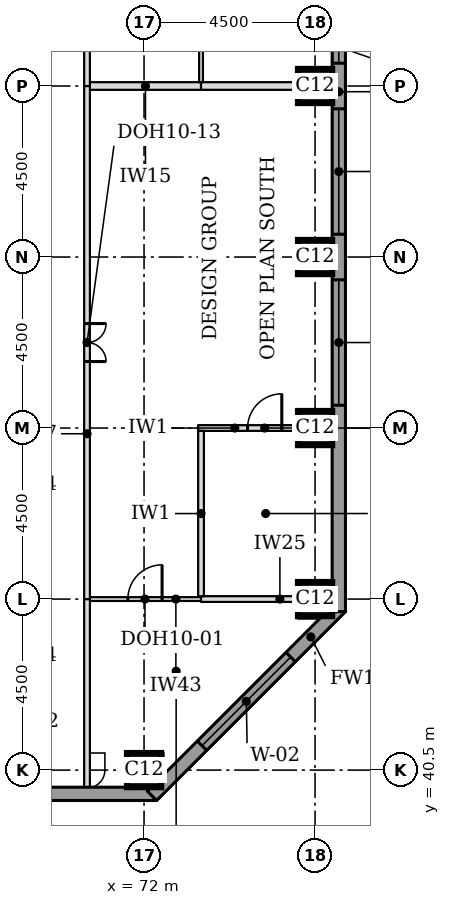
"""IFC4 building model, lengths in metres.
Left out: names, types, materials, properties, quantities, classifications, styles, units other than length and angle.
Written with IfcOpenShell. Run it as: python <this file> out.ifc"""

import sys

from ifc_helpers import new_model, si_unit, direction, frame, frame_2d, origin, origin_2d, place, context, subcontext, project, spatial, rectangle, extrude, element, fill, save


model = new_model("IFC4")
c1 = context("Model", 3, precision=1e-05, world=origin(), true_north=direction((0.0, 1.0)))
c2 = subcontext(c1, "Body", "Model", "MODEL_VIEW")
j1 = project(units=[si_unit("LENGTHUNIT", "METRE"), si_unit("PLANEANGLEUNIT", "RADIAN")], contexts=[c1])
p1 = place(None, origin())
s1 = spatial("IfcSite", under=j1, at=p1, CompositionType="ELEMENT")
p2 = place(p1, origin())
s2 = spatial("IfcBuilding", under=s1, at=p2, CompositionType="ELEMENT")
p3 = place(p2, frame((0.0, 0.0, 223.0)))
s3 = spatial("IfcBuildingStorey", under=s2, at=p3, CompositionType="ELEMENT", Elevation=223.0)
for number, where, z_axis, x_axis in (
    (1, (72.0, 40.5, 0.0), (0.0, 0.0, 1.0), (1.0, 0.0, 0.0)),
    (2, (76.5, 45.0, 0.0), (0.0, 0.0, 1.0), (1.0, 0.0, 0.0)),
    (3, (76.5, 49.5, 0.0), (0.0, 0.0, 1.0), (1.0, 0.0, 0.0)),
    (4, (76.5, 54.0, 0.0), (0.0, 0.0, 1.0), (1.0, 0.0, 0.0)),
    (5, (76.5, 58.5, 0.0), (0.0, 0.0, 1.0), (1.0, 0.0, 0.0)),
):
    element("IfcColumn", number, at=place(p3, frame(where, z_axis=z_axis, x_axis=x_axis)), inside=s3, PredefinedType="COLUMN", context=c2, shape_type="SweptSolid", body=[
        extrude(rectangle(XDim=0.9, YDim=0.9, at=origin_2d()), origin(), (0.0, 0.0, 1.0), 3.7),
    ])
p4 = place(p3, frame((36.0, 39.875, 0.0), z_axis=(0.0, 0.0, 1.0), x_axis=(1.0, 0.0, 0.0)))
e6 = element("IfcWall", 6, at=p4, inside=s3, PredefinedType="STANDARD", context=c2, shape_type="SweptSolid", body=[
    extrude(rectangle(XDim=36.331, YDim=0.35, at=frame_2d((18.166, 0.0))), origin(), (0.0, 0.0, 1.0), 3.525),
])
p5 = place(p4, frame((5.1, 0.0, 0.9)))
e7 = element("IfcOpeningElement", 7, at=p5, cuts=e6, PredefinedType="OPENING", context=c2, shape_type="SweptSolid", body=[
    extrude(rectangle(XDim=3.3, YDim=1.9, at=frame_2d((1.65, 0.95))), frame((0.0, 0.185, 0.0), z_axis=(0.0, -1.0, 0.0), x_axis=(1.0, 0.0, 0.0)), (0.0, 0.0, 1.0), 0.37),
])
p6 = place(p4, frame((9.6, 0.0, 0.9)))
e8 = element("IfcOpeningElement", 8, at=p6, cuts=e6, PredefinedType="OPENING", context=c2, shape_type="SweptSolid", body=[
    extrude(rectangle(XDim=3.3, YDim=1.9, at=frame_2d((1.65, 0.95))), frame((0.0, 0.185, 0.0), z_axis=(0.0, -1.0, 0.0), x_axis=(1.0, 0.0, 0.0)), (0.0, 0.0, 1.0), 0.37),
])
p7 = place(p4, frame((14.1, 0.0, 0.9)))
e9 = element("IfcOpeningElement", 9, at=p7, cuts=e6, PredefinedType="OPENING", context=c2, shape_type="SweptSolid", body=[
    extrude(rectangle(XDim=3.3, YDim=1.9, at=frame_2d((1.65, 0.95))), frame((0.0, 0.185, 0.0), z_axis=(0.0, -1.0, 0.0), x_axis=(1.0, 0.0, 0.0)), (0.0, 0.0, 1.0), 0.37),
])
p8 = place(p4, frame((18.6, 0.0, 0.9)))
e10 = element("IfcOpeningElement", 10, at=p8, cuts=e6, PredefinedType="OPENING", context=c2, shape_type="SweptSolid", body=[
    extrude(rectangle(XDim=3.3, YDim=1.9, at=frame_2d((1.65, 0.95))), frame((0.0, 0.185, 0.0), z_axis=(0.0, -1.0, 0.0), x_axis=(1.0, 0.0, 0.0)), (0.0, 0.0, 1.0), 0.37),
])
p9 = place(p4, frame((23.1, 0.0, 0.9)))
e11 = element("IfcOpeningElement", 11, at=p9, cuts=e6, PredefinedType="OPENING", context=c2, shape_type="SweptSolid", body=[
    extrude(rectangle(XDim=3.3, YDim=1.9, at=frame_2d((1.65, 0.95))), frame((0.0, 0.185, 0.0), z_axis=(0.0, -1.0, 0.0), x_axis=(1.0, 0.0, 0.0)), (0.0, 0.0, 1.0), 0.37),
])
p10 = place(p4, frame((27.6, 0.0, 0.9)))
e12 = element("IfcOpeningElement", 12, at=p10, cuts=e6, PredefinedType="OPENING", context=c2, shape_type="SweptSolid", body=[
    extrude(rectangle(XDim=3.3, YDim=1.9, at=frame_2d((1.65, 0.95))), frame((0.0, 0.185, 0.0), z_axis=(0.0, -1.0, 0.0), x_axis=(1.0, 0.0, 0.0)), (0.0, 0.0, 1.0), 0.37),
])
p11 = place(p3, frame((72.208, 39.824, 0.0), z_axis=(0.0, 0.0, 1.0), x_axis=(0.707106781187, 0.707106781187, 0.0)))
e13 = element("IfcWall", 13, at=p11, inside=s3, PredefinedType="STANDARD", context=c2, shape_type="SweptSolid", body=[
    extrude(rectangle(XDim=7.027, YDim=0.35, at=frame_2d((3.513, 0.0))), origin(), (0.0, 0.0, 1.0), 3.525),
])
p12 = place(p11, frame((1.863, 0.0, 0.9)))
e14 = element("IfcOpeningElement", 14, at=p12, cuts=e13, PredefinedType="OPENING", context=c2, shape_type="SweptSolid", body=[
    extrude(rectangle(XDim=3.3, YDim=1.9, at=frame_2d((1.65, 0.95))), frame((0.0, 0.185, 0.0), z_axis=(0.0, -1.0, 0.0), x_axis=(1.0, 0.0, 0.0)), (0.0, 0.0, 1.0), 0.37),
])
p13 = place(p3, frame((77.125, 44.669, 0.0), z_axis=(0.0, 0.0, 1.0), x_axis=(0.0, 1.0, 0.0)))
e15 = element("IfcWall", 15, at=p13, inside=s3, PredefinedType="STANDARD", context=c2, shape_type="SweptSolid", body=[
    extrude(rectangle(XDim=32.163, YDim=0.35, at=frame_2d((16.081, 0.0))), origin(), (0.0, 0.0, 1.0), 3.525),
])
p14 = place(p13, frame((5.431, 0.0, 0.9)))
e16 = element("IfcOpeningElement", 16, at=p14, cuts=e15, PredefinedType="OPENING", context=c2, shape_type="SweptSolid", body=[
    extrude(rectangle(XDim=3.3, YDim=1.9, at=frame_2d((1.65, 0.95))), frame((0.0, 0.185, 0.0), z_axis=(0.0, -1.0, 0.0), x_axis=(1.0, 0.0, 0.0)), (0.0, 0.0, 1.0), 0.37),
])
p15 = place(p13, frame((9.931, 0.0, 0.9)))
e17 = element("IfcOpeningElement", 17, at=p15, cuts=e15, PredefinedType="OPENING", context=c2, shape_type="SweptSolid", body=[
    extrude(rectangle(XDim=3.3, YDim=1.9, at=frame_2d((1.65, 0.95))), frame((0.0, 0.185, 0.0), z_axis=(0.0, -1.0, 0.0), x_axis=(1.0, 0.0, 0.0)), (0.0, 0.0, 1.0), 0.37),
])
p16 = place(p13, frame((14.431, 0.0, 0.9)))
e18 = element("IfcOpeningElement", 18, at=p16, cuts=e15, PredefinedType="OPENING", context=c2, shape_type="SweptSolid", body=[
    extrude(rectangle(XDim=3.3, YDim=1.9, at=frame_2d((1.65, 0.95))), frame((0.0, 0.185, 0.0), z_axis=(0.0, -1.0, 0.0), x_axis=(1.0, 0.0, 0.0)), (0.0, 0.0, 1.0), 0.37),
])
p17 = place(p13, frame((18.931, 0.0, 0.9)))
e19 = element("IfcOpeningElement", 19, at=p17, cuts=e15, PredefinedType="OPENING", context=c2, shape_type="SweptSolid", body=[
    extrude(rectangle(XDim=3.3, YDim=1.9, at=frame_2d((1.65, 0.95))), frame((0.0, 0.185, 0.0), z_axis=(0.0, -1.0, 0.0), x_axis=(1.0, 0.0, 0.0)), (0.0, 0.0, 1.0), 0.37),
])
p18 = place(p13, frame((23.431, 0.0, 0.9)))
e20 = element("IfcOpeningElement", 20, at=p18, cuts=e15, PredefinedType="OPENING", context=c2, shape_type="SweptSolid", body=[
    extrude(rectangle(XDim=3.3, YDim=1.9, at=frame_2d((1.65, 0.95))), frame((0.0, 0.185, 0.0), z_axis=(0.0, -1.0, 0.0), x_axis=(1.0, 0.0, 0.0)), (0.0, 0.0, 1.0), 0.37),
])
p19 = place(p3, frame((70.575, 45.0, 0.0), z_axis=(0.0, 0.0, 1.0), x_axis=(1.0, 0.0, 0.0)))
e21 = element("IfcWall", 21, at=p19, inside=s3, PredefinedType="PARTITIONING", context=c2, shape_type="SweptSolid", body=[
    extrude(rectangle(XDim=2.925, YDim=0.1, at=frame_2d((1.462, 0.0))), origin(), (0.0, 0.0, 1.0), 3.096),
])
p20 = place(p19, frame((1.0, 0.0, 0.0)))
e22 = element("IfcOpeningElement", 22, at=p20, cuts=e21, PredefinedType="OPENING", context=c2, shape_type="SweptSolid", body=[
    extrude(rectangle(XDim=0.9, YDim=2.1, at=frame_2d((0.45, 1.05))), frame((0.0, 0.06, 0.0), z_axis=(0.0, -1.0, 0.0), x_axis=(1.0, 0.0, 0.0)), (0.0, 0.0, 1.0), 0.12),
])
p21 = place(p3, frame((73.5, 45.0, 0.0), z_axis=(0.0, 0.0, 1.0), x_axis=(1.0, 0.0, 0.0)))
e23 = element("IfcWall", 23, at=p21, inside=s3, PredefinedType="PARTITIONING", context=c2, shape_type="SweptSolid", body=[
    extrude(rectangle(XDim=2.55, YDim=0.15, at=frame_2d((1.275, 0.0))), origin(), (0.0, 0.0, 1.0), 3.096),
])
p22 = place(p3, frame((73.425, 49.5, 0.0), z_axis=(0.0, 0.0, 1.0), x_axis=(1.0, 0.0, 0.0)))
e24 = element("IfcWall", 24, at=p22, inside=s3, PredefinedType="PARTITIONING", context=c2, shape_type="SweptSolid", body=[
    extrude(rectangle(XDim=3.525, YDim=0.15, at=frame_2d((1.762, 0.0))), origin(), (0.0, 0.0, 1.0), 3.55),
])
p23 = place(p22, frame((1.3, 0.0, 0.0)))
e25 = element("IfcOpeningElement", 25, at=p23, cuts=e24, PredefinedType="OPENING", context=c2, shape_type="SweptSolid", body=[
    extrude(rectangle(XDim=0.9, YDim=2.1, at=frame_2d((0.45, 1.05))), frame((0.0, 0.085, 0.0), z_axis=(0.0, -1.0, 0.0), x_axis=(1.0, 0.0, 0.0)), (0.0, 0.0, 1.0), 0.17),
])
p24 = place(p3, frame((70.575, 58.5, 0.0), z_axis=(0.0, 0.0, 1.0), x_axis=(1.0, 0.0, 0.0)))
e26 = element("IfcWall", 26, at=p24, inside=s3, PredefinedType="PARTITIONING", context=c2, shape_type="SweptSolid", body=[
    extrude(rectangle(XDim=2.925, YDim=0.2, at=frame_2d((1.462, 0.0))), origin(), (0.0, 0.0, 1.0), 3.55),
])
p25 = place(p3, frame((73.5, 58.5, 0.0), z_axis=(0.0, 0.0, 1.0), x_axis=(1.0, 0.0, 0.0)))
e27 = element("IfcWall", 27, at=p25, inside=s3, PredefinedType="PARTITIONING", context=c2, shape_type="SweptSolid", body=[
    extrude(rectangle(XDim=3.45, YDim=0.2, at=frame_2d((1.725, 0.0))), origin(), (0.0, 0.0, 1.0), 3.55),
])
p26 = place(p3, frame((70.5, 40.05, 0.0), z_axis=(0.0, 0.0, 1.0), x_axis=(0.0, 1.0, 0.0)))
e28 = element("IfcWall", 28, at=p26, inside=s3, PredefinedType="PARTITIONING", context=c2, shape_type="SweptSolid", body=[
    extrude(rectangle(XDim=4.95, YDim=0.15, at=frame_2d((2.475, 0.0))), origin(), (0.0, 0.0, 1.0), 3.55),
])
p27 = place(p3, frame((70.5, 45.0, 0.0), z_axis=(0.0, 0.0, 1.0), x_axis=(0.0, 1.0, 0.0)))
e29 = element("IfcWall", 29, at=p27, inside=s3, PredefinedType="PARTITIONING", context=c2, shape_type="SweptSolid", body=[
    extrude(rectangle(XDim=13.5, YDim=0.15, at=frame_2d((6.75, 0.0))), origin(), (0.0, 0.0, 1.0), 3.55),
])
p28 = place(p27, frame((6.25, 0.0, 0.0)))
e30 = element("IfcOpeningElement", 30, at=p28, cuts=e29, PredefinedType="OPENING", context=c2, shape_type="SweptSolid", body=[
    extrude(rectangle(XDim=1.0, YDim=2.1, at=frame_2d((0.5, 1.05))), frame((0.0, 0.085, 0.0), z_axis=(0.0, -1.0, 0.0), x_axis=(1.0, 0.0, 0.0)), (0.0, 0.0, 1.0), 0.17),
])
p29 = place(p3, frame((73.5, 45.075, 0.0), z_axis=(0.0, 0.0, 1.0), x_axis=(0.0, 1.0, 0.0)))
e31 = element("IfcWall", 31, at=p29, inside=s3, PredefinedType="PARTITIONING", context=c2, shape_type="SweptSolid", body=[
    extrude(rectangle(XDim=4.35, YDim=0.15, at=frame_2d((2.175, 0.0))), origin(), (0.0, 0.0, 1.0), 3.55),
])
p30 = place(p3, frame((70.5, 58.5, 0.0), z_axis=(0.0, 0.0, 1.0), x_axis=(0.0, 1.0, 0.0)))
e32 = element("IfcWall", 32, at=p30, inside=s3, PredefinedType="PARTITIONING", context=c2, shape_type="SweptSolid", body=[
    extrude(rectangle(XDim=19.5, YDim=0.15, at=frame_2d((9.75, 0.0))), origin(), (0.0, 0.0, 1.0), 3.55),
])
p31 = place(p30, frame((9.25, 0.0, 0.0)))
e33 = element("IfcOpeningElement", 33, at=p31, cuts=e32, PredefinedType="OPENING", context=c2, shape_type="SweptSolid", body=[
    extrude(rectangle(XDim=1.0, YDim=2.1, at=frame_2d((0.5, 1.05))), frame((0.0, 0.085, 0.0), z_axis=(0.0, -1.0, 0.0), x_axis=(1.0, 0.0, 0.0)), (0.0, 0.0, 1.0), 0.17),
])
p32 = place(p3, frame((73.5, 58.6, 0.0), z_axis=(0.0, 0.0, 1.0), x_axis=(0.0, 1.0, 0.0)))
e34 = element("IfcWall", 34, at=p32, inside=s3, PredefinedType="PARTITIONING", context=c2, shape_type="SweptSolid", body=[
    extrude(rectangle(XDim=4.4, YDim=0.1, at=frame_2d((2.2, 0.0))), origin(), (0.0, 0.0, 1.0), 3.55),
])
p33 = place(p32, frame((1.75, 0.0, 0.0)))
e35 = element("IfcOpeningElement", 35, at=p33, cuts=e34, PredefinedType="OPENING", context=c2, shape_type="SweptSolid", body=[
    extrude(rectangle(XDim=0.9, YDim=2.1, at=frame_2d((0.45, 1.05))), frame((0.0, 0.06, 0.0), z_axis=(0.0, -1.0, 0.0), x_axis=(1.0, 0.0, 0.0)), (0.0, 0.0, 1.0), 0.12),
])
p34 = place(p12, origin())
e36 = element("IfcWindow", 36, at=p34, inside=s3, PartitioningType="SINGLE_PANEL", PredefinedType="WINDOW", context=c2, shape_type="SweptSolid", body=[
    extrude(rectangle(XDim=3.3, YDim=1.9, at=frame_2d((1.65, 0.95))), frame((0.0, 0.085, 0.0), z_axis=(0.0, -1.0, 0.0), x_axis=(1.0, 0.0, 0.0)), (0.0, 0.0, 1.0), 0.06),
])
fill(e14, e36)
p35 = place(p14, origin())
e37 = element("IfcWindow", 37, at=p35, inside=s3, PartitioningType="SINGLE_PANEL", PredefinedType="WINDOW", context=c2, shape_type="SweptSolid", body=[
    extrude(rectangle(XDim=3.3, YDim=1.9, at=frame_2d((1.65, 0.95))), frame((0.0, 0.085, 0.0), z_axis=(0.0, -1.0, 0.0), x_axis=(1.0, 0.0, 0.0)), (0.0, 0.0, 1.0), 0.06),
])
fill(e16, e37)
p36 = place(p15, origin())
e38 = element("IfcWindow", 38, at=p36, inside=s3, PartitioningType="SINGLE_PANEL", PredefinedType="WINDOW", context=c2, shape_type="SweptSolid", body=[
    extrude(rectangle(XDim=3.3, YDim=1.9, at=frame_2d((1.65, 0.95))), frame((0.0, 0.085, 0.0), z_axis=(0.0, -1.0, 0.0), x_axis=(1.0, 0.0, 0.0)), (0.0, 0.0, 1.0), 0.06),
])
fill(e17, e38)
p37 = place(p16, origin())
e39 = element("IfcWindow", 39, at=p37, inside=s3, PartitioningType="SINGLE_PANEL", PredefinedType="WINDOW", context=c2, shape_type="SweptSolid", body=[
    extrude(rectangle(XDim=3.3, YDim=1.9, at=frame_2d((1.65, 0.95))), frame((0.0, 0.085, 0.0), z_axis=(0.0, -1.0, 0.0), x_axis=(1.0, 0.0, 0.0)), (0.0, 0.0, 1.0), 0.06),
])
fill(e18, e39)
p38 = place(p28, frame((1.0, 0.0, 0.0), z_axis=(0.0, 0.0, 1.0), x_axis=(-1.0, 0.0, 0.0)))
e40 = element("IfcDoor", 40, at=p38, inside=s3, OperationType="DOUBLE_DOOR_SINGLE_SWING", PredefinedType="DOOR", context=c2, shape_type="SweptSolid", body=[
    extrude(rectangle(XDim=1.0, YDim=2.1, at=frame_2d((0.5, 1.05))), frame((0.0, 0.025, 0.0), z_axis=(0.0, -1.0, 0.0), x_axis=(1.0, 0.0, 0.0)), (0.0, 0.0, 1.0), 0.05),
])
fill(e30, e40)
p39 = place(p20, origin())
e41 = element("IfcDoor", 41, at=p39, inside=s3, OperationType="SINGLE_SWING_RIGHT", PredefinedType="DOOR", context=c2, shape_type="SweptSolid", body=[
    extrude(rectangle(XDim=0.9, YDim=2.1, at=frame_2d((0.45, 1.05))), frame((0.0, 0.025, 0.0), z_axis=(0.0, -1.0, 0.0), x_axis=(1.0, 0.0, 0.0)), (0.0, 0.0, 1.0), 0.05),
])
fill(e22, e41)
p40 = place(p23, origin())
e42 = element("IfcDoor", 42, at=p40, inside=s3, OperationType="SINGLE_SWING_RIGHT", PredefinedType="DOOR", context=c2, shape_type="SweptSolid", body=[
    extrude(rectangle(XDim=0.9, YDim=2.1, at=frame_2d((0.45, 1.05))), frame((0.0, 0.025, 0.0), z_axis=(0.0, -1.0, 0.0), x_axis=(1.0, 0.0, 0.0)), (0.0, 0.0, 1.0), 0.05),
])
fill(e25, e42)
save(model, sys.argv[1])
